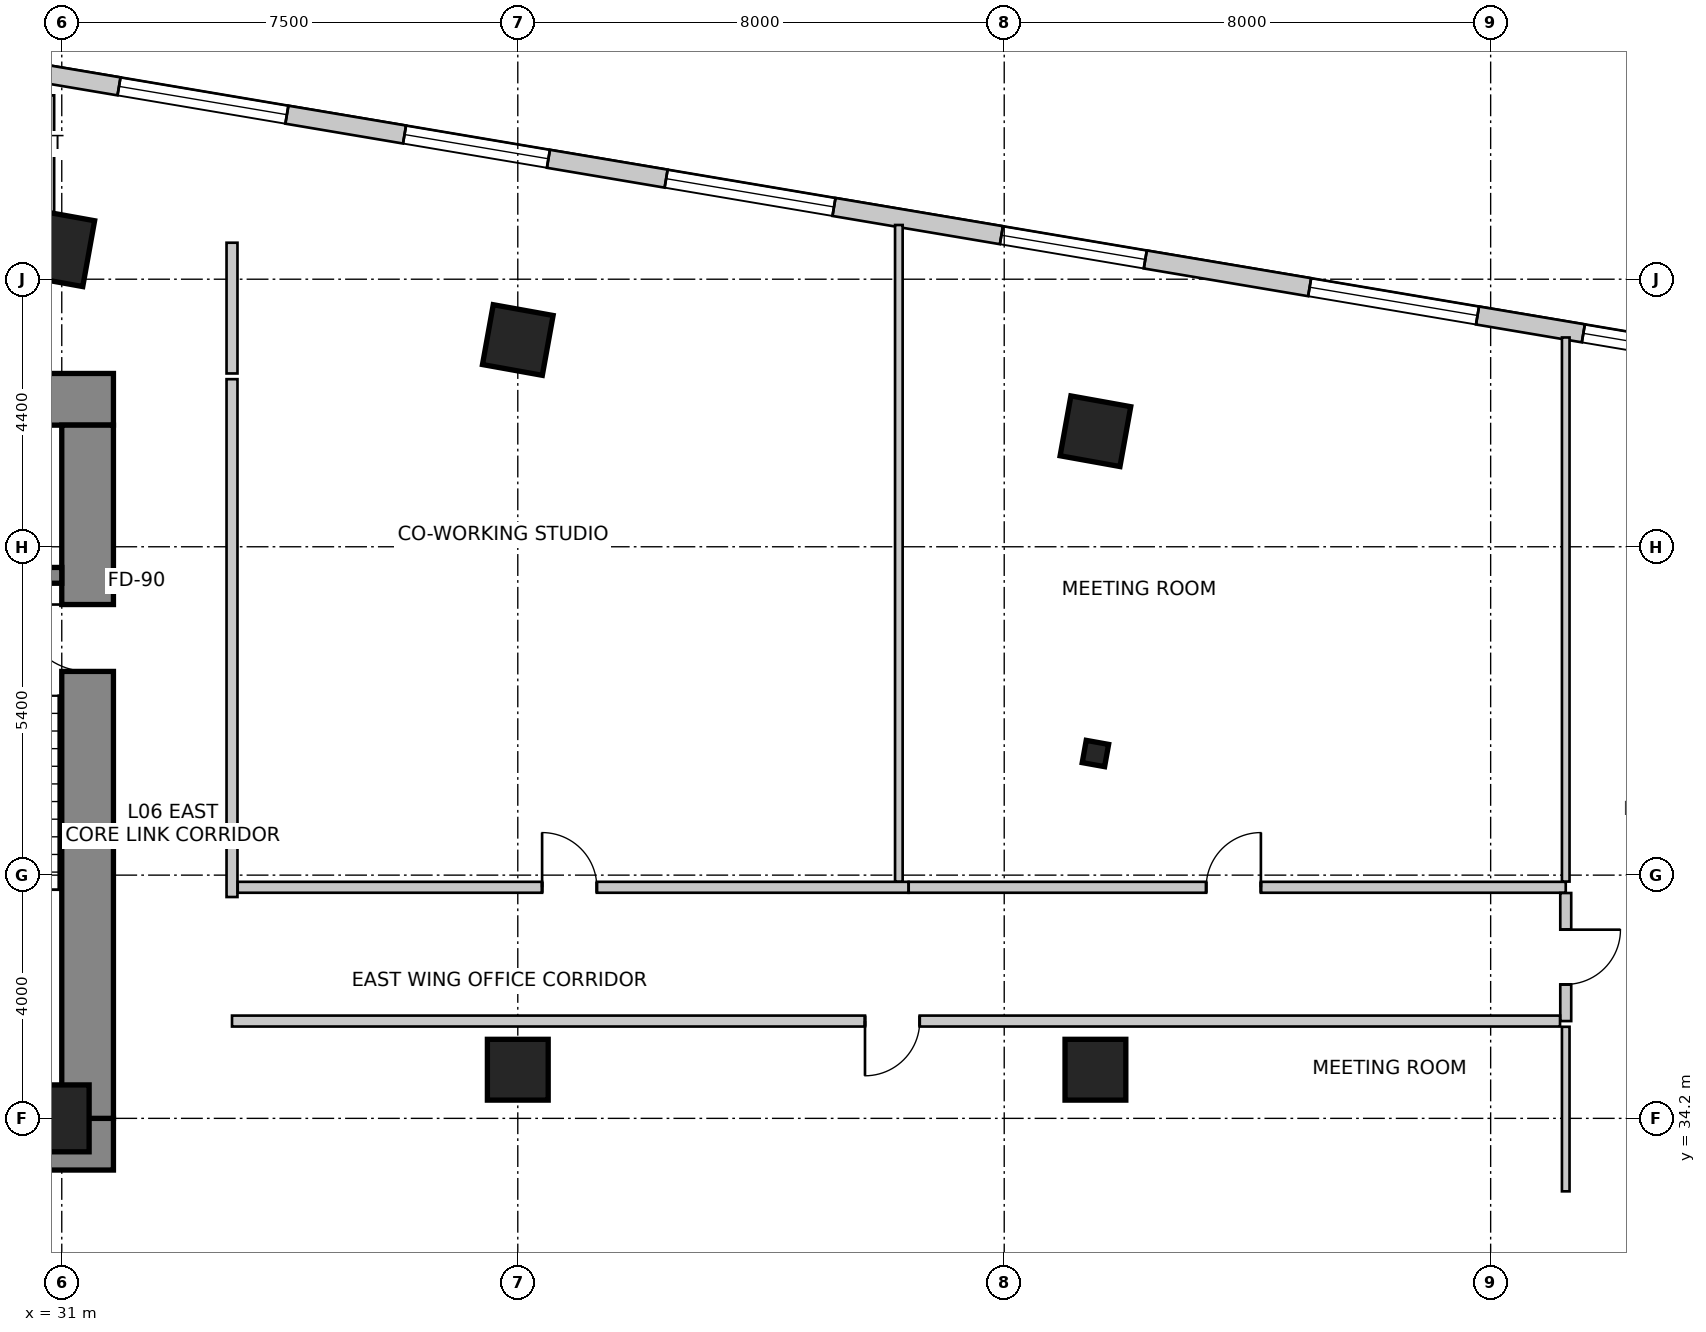
"""IFC4 building model, lengths in metres.
Left out: names, types, materials, properties, quantities, classifications, styles, units other than length and angle.
Written with IfcOpenShell. Run it as: python <this file> out.ifc"""

import sys

from ifc_helpers import new_model, si_unit, direction, frame, frame_2d, origin, origin_2d, place, context, subcontext, project, spatial, rectangle, i_section, extrude, source, transform, mapped, element, fill, save


model = new_model("IFC4")
c1 = context("Model", 3, precision=1e-05, world=origin(), true_north=direction((0.0, 1.0)))
c2 = subcontext(c1, "Body", "Model", "MODEL_VIEW")
j1 = project(units=[si_unit("LENGTHUNIT", "METRE"), si_unit("PLANEANGLEUNIT", "RADIAN")], contexts=[c1])
p1 = place(None, origin())
s1 = spatial("IfcSite", under=j1, at=p1, CompositionType="ELEMENT")
p2 = place(p1, origin())
s2 = spatial("IfcBuilding", under=s1, at=p2, CompositionType="ELEMENT")
p3 = place(p2, frame((0.0, 0.0, 27.0)))
s3 = spatial("IfcBuildingStorey", under=s2, at=p3, CompositionType="ELEMENT", Elevation=27.0)
p4 = place(p3, frame((15.75, 46.025, 0.0), z_axis=(0.0, 0.0, 1.0), x_axis=(1.0, 0.0, 0.0)))
e1 = element("IfcWall", 1, at=p4, inside=s3, PredefinedType="SHEAR", context=c2, shape_type="SweptSolid", body=[
    extrude(rectangle(XDim=16.1, YDim=0.85, at=frame_2d((8.05, 0.0))), origin(), (0.0, 0.0, 1.0), 4.0),
])
p5 = place(p3, frame((15.75, 33.775, 0.0), z_axis=(0.0, 0.0, 1.0), x_axis=(1.0, 0.0, 0.0)))
e2 = element("IfcWall", 2, at=p5, inside=s3, PredefinedType="SHEAR", context=c2, shape_type="SweptSolid", body=[
    extrude(rectangle(XDim=16.1, YDim=0.85, at=frame_2d((8.05, 0.0))), origin(), (0.0, 0.0, 1.0), 4.0),
])
m1 = source(origin(), c2, "Body", "SweptSolid", [
    extrude(rectangle(XDim=1.3, YDim=2.15, at=frame_2d((0.65, 1.075))), frame((0.0, 0.435, 0.0), z_axis=(0.0, -1.0, 0.0), x_axis=(1.0, 0.0, 0.0)), (0.0, 0.0, 1.0), 0.87),
])
p6 = place(p5, frame((10.18, 0.0, 0.0)))
e3 = element("IfcOpeningElement", 3, at=p6, cuts=e2, PredefinedType="OPENING", context=c2, shape_type="MappedRepresentation", body=[
    mapped(m1, transform((0.0, 0.0, 0.0), scale=1.0)),
])
p7 = place(p3, frame((31.425, 34.2, 0.0), z_axis=(0.0, 0.0, 1.0), x_axis=(0.0, 1.0, 0.0)))
e4 = element("IfcWall", 4, at=p7, inside=s3, PredefinedType="SHEAR", context=c2, shape_type="SweptSolid", body=[
    extrude(rectangle(XDim=11.4, YDim=0.85, at=frame_2d((5.7, 0.0))), origin(), (0.0, 0.0, 1.0), 4.0),
])
m2 = source(origin(), c2, "Body", "SweptSolid", [
    extrude(rectangle(XDim=1.1, YDim=2.15, at=frame_2d((0.55, 1.075))), frame((0.0, 0.435, 0.0), z_axis=(0.0, -1.0, 0.0), x_axis=(1.0, 0.0, 0.0)), (0.0, 0.0, 1.0), 0.87),
])
p8 = place(p7, frame((7.35, 0.0, 0.0)))
e5 = element("IfcOpeningElement", 5, at=p8, cuts=e4, PredefinedType="OPENING", context=c2, shape_type="MappedRepresentation", body=[
    mapped(m2, transform((0.0, 0.0, 0.0), scale=1.0)),
])
p9 = place(p3, frame((27.5, 43.13, 0.0), z_axis=(0.0, 0.0, 1.0), x_axis=(1.0, 0.0, 0.0)))
e6 = element("IfcWall", 6, at=p9, inside=s3, PredefinedType="SHEAR", context=c2, shape_type="SweptSolid", body=[
    extrude(rectangle(XDim=3.5, YDim=0.26, at=frame_2d((1.75, 0.0))), origin(), (0.0, 0.0, 1.0), 4.0),
])
m3 = source(origin(), c2, "Body", "SweptSolid", [
    extrude(rectangle(XDim=0.9, YDim=1.1, at=origin_2d()), origin(), (0.0, 0.0, 1.0), 4.0),
])
p10 = place(p3, frame((31.0, 48.5, 0.0), z_axis=(0.0, 0.0, 1.0), x_axis=(0.984195607969, -0.17708474032, 0.0)))
e7 = element("IfcColumn", 7, at=p10, inside=s3, PredefinedType="COLUMN", context=c2, shape_type="MappedRepresentation", body=[
    mapped(m3, transform((0.0, 0.0, 0.0), scale=1.0)),
])
m4 = source(origin(), c2, "Body", "SweptSolid", [
    extrude(rectangle(XDim=1.0, YDim=1.0, at=origin_2d()), origin(), (0.0, 0.0, 1.0), 4.0),
])
for number, where, z_axis, x_axis in (
    (8, (38.5, 47.0, 0.0), (0.0, 0.0, 1.0), (0.984, -0.177, 0.0)),
    (9, (48.0, 45.5, 0.0), (0.0, 0.0, 1.0), (0.984, -0.177, 0.0)),
):
    element("IfcColumn", number, at=place(p3, frame(where, z_axis=z_axis, x_axis=x_axis)), inside=s3, PredefinedType="COLUMN", context=c2, shape_type="MappedRepresentation", body=[
        mapped(m4, transform((0.0, 0.0, 0.0), scale=1.0)),
    ])
p11 = place(p3, frame((31.0, 34.2, 0.0), z_axis=(0.0, 0.0, 1.0), x_axis=(1.0, 0.0, 0.0)))
e10 = element("IfcColumn", 10, at=p11, inside=s3, PredefinedType="COLUMN", context=c2, shape_type="MappedRepresentation", body=[
    mapped(m3, transform((0.0, 0.0, 0.0), scale=1.0)),
])
for number, where, z_axis, x_axis in (
    (11, (38.5, 35.0, 0.0), (0.0, 0.0, 1.0), (1.0, 0.0, 0.0)),
    (12, (48.0, 35.0, 0.0), (0.0, 0.0, 1.0), (1.0, 0.0, 0.0)),
):
    element("IfcColumn", number, at=place(p3, frame(where, z_axis=z_axis, x_axis=x_axis)), inside=s3, PredefinedType="COLUMN", context=c2, shape_type="MappedRepresentation", body=[
        mapped(m4, transform((0.0, 0.0, 0.0), scale=1.0)),
    ])
m5 = source(origin(), c2, "Body", "SweptSolid", [
    extrude(i_section(OverallWidth=0.374, OverallDepth=0.372, WebThickness=0.016, FlangeThickness=0.026, FilletRadius=0.015, at=origin_2d()), origin(), (0.0, 0.0, 1.0), 4.35),
])
p12 = place(p3, frame((48.0, 40.2, -0.35), z_axis=(0.0, 0.0, 1.0), x_axis=(0.984195607969, -0.17708474032, 0.0)))
e13 = element("IfcColumn", 13, at=p12, inside=s3, PredefinedType="COLUMN", context=c2, shape_type="MappedRepresentation", body=[
    mapped(m5, transform((0.0, 0.0, 0.0), scale=1.0)),
])
p13 = place(p3, frame((58.761, 46.648, 0.0), z_axis=(0.0, 0.0, 1.0), x_axis=(-0.98607502735, 0.166301053624, 0.0)))
e14 = element("IfcWall", 14, at=p13, inside=s3, PredefinedType="SOLIDWALL", context=c2, shape_type="SweptSolid", body=[
    extrude(rectangle(XDim=37.397, YDim=0.3, at=frame_2d((18.699, 0.0))), origin(), (0.0, 0.0, 1.0), 3.75),
])
m6 = source(origin(), c2, "Body", "SweptSolid", [
    extrude(rectangle(XDim=2.4, YDim=2.2, at=frame_2d((1.2, 1.1))), frame((0.0, 0.16, 0.0), z_axis=(0.0, -1.0, 0.0), x_axis=(1.0, 0.0, 0.0)), (0.0, 0.0, 1.0), 0.32),
])
p14 = place(p13, frame((0.375, 0.0, 0.85)))
e15 = element("IfcOpeningElement", 15, at=p14, cuts=e14, PredefinedType="OPENING", context=c2, shape_type="MappedRepresentation", body=[
    mapped(m6, transform((0.0, 0.0, 0.0), scale=1.0)),
])
m7 = source(origin(), c2, "Body", "SweptSolid", [
    extrude(rectangle(XDim=2.8, YDim=2.4, at=frame_2d((1.4, 1.2))), frame((0.0, 0.16, 0.0), z_axis=(0.0, -1.0, 0.0), x_axis=(1.0, 0.0, 0.0)), (0.0, 0.0, 1.0), 0.32),
])
p15 = place(p13, frame((4.54, 0.0, 0.85)))
e16 = element("IfcOpeningElement", 16, at=p15, cuts=e14, PredefinedType="OPENING", context=c2, shape_type="MappedRepresentation", body=[
    mapped(m7, transform((0.0, 0.0, 0.0), scale=1.0)),
])
p16 = place(p13, frame((10.081, 0.0, 0.85)))
e17 = element("IfcOpeningElement", 17, at=p16, cuts=e14, PredefinedType="OPENING", context=c2, shape_type="MappedRepresentation", body=[
    mapped(m6, transform((0.0, 0.0, 0.0), scale=1.0)),
])
p17 = place(p13, frame((15.273, 0.0, 0.85)))
e18 = element("IfcOpeningElement", 18, at=p17, cuts=e14, PredefinedType="OPENING", context=c2, shape_type="MappedRepresentation", body=[
    mapped(m7, transform((0.0, 0.0, 0.0), scale=1.0)),
])
p18 = place(p13, frame((20.036, 0.0, 0.85)))
e19 = element("IfcOpeningElement", 19, at=p18, cuts=e14, PredefinedType="OPENING", context=c2, shape_type="MappedRepresentation", body=[
    mapped(m6, transform((0.0, 0.0, 0.0), scale=1.0)),
])
p19 = place(p13, frame((24.398, 0.0, 0.85)))
e20 = element("IfcOpeningElement", 20, at=p19, cuts=e14, PredefinedType="OPENING", context=c2, shape_type="MappedRepresentation", body=[
    mapped(m7, transform((0.0, 0.0, 0.0), scale=1.0)),
])
p20 = place(p13, frame((29.757, 0.0, 0.85)))
e21 = element("IfcOpeningElement", 21, at=p20, cuts=e14, PredefinedType="OPENING", context=c2, shape_type="MappedRepresentation", body=[
    mapped(m7, transform((0.0, 0.0, 0.0), scale=1.0)),
])
p21 = place(p13, frame((34.256, 0.0, 0.85)))
e22 = element("IfcOpeningElement", 22, at=p21, cuts=e14, PredefinedType="OPENING", context=c2, shape_type="MappedRepresentation", body=[
    mapped(m7, transform((0.0, 0.0, 0.0), scale=1.0)),
])
p22 = place(p3, frame((25.362, 48.6, 0.0), z_axis=(0.0, 0.0, 1.0), x_axis=(1.0, 0.0, 0.0)))
e23 = element("IfcWall", 23, at=p22, inside=s3, PredefinedType="PARTITIONING", context=c2, shape_type="SweptSolid", body=[
    extrude(rectangle(XDim=5.598, YDim=0.18, at=frame_2d((2.799, 0.0))), origin(), (0.0, 0.0, 1.0), 2.892),
])
m8 = source(origin(), c2, "Body", "SweptSolid", [
    extrude(rectangle(XDim=0.9, YDim=2.15, at=frame_2d((0.45, 1.075))), frame((0.0, 0.1, 0.0), z_axis=(0.0, -1.0, 0.0), x_axis=(1.0, 0.0, 0.0)), (0.0, 0.0, 1.0), 0.2),
])
p23 = place(p22, frame((2.349, 0.0, 0.0)))
e24 = element("IfcOpeningElement", 24, at=p23, cuts=e23, PredefinedType="OPENING", context=c2, shape_type="MappedRepresentation", body=[
    mapped(m8, transform((0.0, 0.0, 0.0), scale=1.0)),
])
p24 = place(p3, frame((33.8, 48.6, 0.0), z_axis=(0.0, 0.0, 1.0), x_axis=(0.0, -1.0, 0.0)))
e25 = element("IfcWall", 25, at=p24, inside=s3, PredefinedType="PARTITIONING", context=c2, shape_type="SweptSolid", body=[
    extrude(rectangle(XDim=2.15, YDim=0.18, at=frame_2d((1.075, 0.0))), origin(), (0.0, 0.0, 1.0), 2.892),
])
p25 = place(p3, frame((33.8, 46.356, 0.0), z_axis=(0.0, 0.0, 1.0), x_axis=(0.0, -1.0, 0.0)))
e26 = element("IfcWall", 26, at=p25, inside=s3, PredefinedType="PARTITIONING", context=c2, shape_type="SweptSolid", body=[
    extrude(rectangle(XDim=8.516, YDim=0.18, at=frame_2d((4.258, 0.0))), origin(), (0.0, 0.0, 1.0), 3.188),
])
p26 = place(p3, frame((33.894, 38.0, 0.0), z_axis=(0.0, 0.0, 1.0), x_axis=(1.0, 0.0, 0.0)))
e27 = element("IfcWall", 27, at=p26, inside=s3, PredefinedType="PARTITIONING", context=c2, shape_type="SweptSolid", body=[
    extrude(rectangle(XDim=11.033, YDim=0.18, at=frame_2d((5.517, 0.0))), origin(), (0.0, 0.0, 1.0), 3.125),
])
p27 = place(p26, frame((5.006, 0.0, 0.0)))
e28 = element("IfcOpeningElement", 28, at=p27, cuts=e27, PredefinedType="OPENING", context=c2, shape_type="MappedRepresentation", body=[
    mapped(m8, transform((0.0, 0.0, 0.0), scale=1.0)),
])
p28 = place(p3, frame((44.929, 38.0, 0.0), z_axis=(0.0, 0.0, 1.0), x_axis=(1.0, 0.0, 0.0)))
e29 = element("IfcWall", 29, at=p28, inside=s3, PredefinedType="PARTITIONING", context=c2, shape_type="SweptSolid", body=[
    extrude(rectangle(XDim=10.806, YDim=0.18, at=frame_2d((5.403, 0.0))), origin(), (0.0, 0.0, 1.0), 3.125),
])
p29 = place(p28, frame((4.892, 0.0, 0.0)))
e30 = element("IfcOpeningElement", 30, at=p29, cuts=e29, PredefinedType="OPENING", context=c2, shape_type="MappedRepresentation", body=[
    mapped(m8, transform((0.0, 0.0, 0.0), scale=1.0)),
])
p30 = place(p3, frame((55.735, 37.906, 0.0), z_axis=(0.0, 0.0, 1.0), x_axis=(0.0, -1.0, 0.0)))
e31 = element("IfcWall", 31, at=p30, inside=s3, PredefinedType="PARTITIONING", context=c2, shape_type="SweptSolid", body=[
    extrude(rectangle(XDim=2.106, YDim=0.18, at=frame_2d((1.053, 0.0))), origin(), (0.0, 0.0, 1.0), 3.75),
])
p31 = place(p30, frame((0.603, 0.0, 0.0)))
e32 = element("IfcOpeningElement", 32, at=p31, cuts=e31, PredefinedType="OPENING", context=c2, shape_type="MappedRepresentation", body=[
    mapped(m8, transform((0.0, 0.0, 0.0), scale=1.0)),
])
p32 = place(p3, frame((55.641, 35.8, 0.0), z_axis=(0.0, 0.0, 1.0), x_axis=(-1.0, 0.0, 0.0)))
e33 = element("IfcWall", 33, at=p32, inside=s3, PredefinedType="PARTITIONING", context=c2, shape_type="SweptSolid", body=[
    extrude(rectangle(XDim=21.841, YDim=0.18, at=frame_2d((10.92, 0.0))), origin(), (0.0, 0.0, 1.0), 3.125),
])
p33 = place(p32, frame((10.531, 0.0, 0.0)))
e34 = element("IfcOpeningElement", 34, at=p33, cuts=e33, PredefinedType="OPENING", context=c2, shape_type="MappedRepresentation", body=[
    mapped(m8, transform((0.0, 0.0, 0.0), scale=1.0)),
])
p34 = place(p3, frame((44.767, 48.892, 0.0), z_axis=(0.0, 0.0, 1.0), x_axis=(0.0, -1.0, 0.0)))
e35 = element("IfcWall", 35, at=p34, inside=s3, PredefinedType="PARTITIONING", context=c2, shape_type="SweptSolid", body=[
    extrude(rectangle(XDim=10.798, YDim=0.125, at=frame_2d((5.399, 0.0))), origin(), (0.0, 0.0, 1.0), 2.892),
])
p35 = place(p3, frame((55.735, 47.042, 0.0), z_axis=(0.0, 0.0, 1.0), x_axis=(0.0, -1.0, 0.0)))
e36 = element("IfcWall", 36, at=p35, inside=s3, PredefinedType="PARTITIONING", context=c2, shape_type="SweptSolid", body=[
    extrude(rectangle(XDim=8.948, YDim=0.125, at=frame_2d((4.474, 0.0))), origin(), (0.0, 0.0, 1.0), 3.75),
])
p36 = place(p3, frame((55.735, 33.0, 0.0), z_axis=(0.0, 0.0, 1.0), x_axis=(0.0, 1.0, 0.0)))
e37 = element("IfcWall", 37, at=p36, inside=s3, PredefinedType="PARTITIONING", context=c2, shape_type="SweptSolid", body=[
    extrude(rectangle(XDim=2.706, YDim=0.125, at=frame_2d((1.353, 0.0))), origin(), (0.0, 0.0, 1.0), 3.75),
])
p37 = place(p3, frame((30.8, 51.024, 0.0), z_axis=(0.0, 0.0, 1.0), x_axis=(0.0, -1.0, 0.0)))
e38 = element("IfcWall", 38, at=p37, inside=s3, PredefinedType="PARTITIONING", context=c2, shape_type="SweptSolid", body=[
    extrude(rectangle(XDim=2.204, YDim=0.15, at=frame_2d((1.102, 0.0))), origin(), (0.0, 0.0, 1.0), 3.75),
])
m9 = source(origin(), c2, "Body", "SweptSolid", [
    extrude(rectangle(XDim=2.4, YDim=2.2, at=frame_2d((1.2, 1.1))), frame((0.0, -0.015, 0.0), z_axis=(0.0, -1.0, 0.0), x_axis=(1.0, 0.0, 0.0)), (0.0, 0.0, 1.0), 0.06),
])
p38 = place(p14, origin())
e39 = element("IfcWindow", 39, at=p38, inside=s3, PartitioningType="SINGLE_PANEL", PredefinedType="WINDOW", context=c2, shape_type="MappedRepresentation", body=[
    mapped(m9, transform((0.0, 0.0, 0.0), scale=1.0)),
])
fill(e15, e39)
m10 = source(origin(), c2, "Body", "SweptSolid", [
    extrude(rectangle(XDim=2.8, YDim=2.4, at=frame_2d((1.4, 1.2))), frame((0.0, -0.015, 0.0), z_axis=(0.0, -1.0, 0.0), x_axis=(1.0, 0.0, 0.0)), (0.0, 0.0, 1.0), 0.06),
])
p39 = place(p15, origin())
e40 = element("IfcWindow", 40, at=p39, inside=s3, PartitioningType="SINGLE_PANEL", PredefinedType="WINDOW", context=c2, shape_type="MappedRepresentation", body=[
    mapped(m10, transform((0.0, 0.0, 0.0), scale=1.0)),
])
fill(e16, e40)
p40 = place(p16, origin())
e41 = element("IfcWindow", 41, at=p40, inside=s3, PartitioningType="SINGLE_PANEL", PredefinedType="WINDOW", context=c2, shape_type="MappedRepresentation", body=[
    mapped(m9, transform((0.0, 0.0, 0.0), scale=1.0)),
])
fill(e17, e41)
p41 = place(p17, origin())
e42 = element("IfcWindow", 42, at=p41, inside=s3, PartitioningType="SINGLE_PANEL", PredefinedType="WINDOW", context=c2, shape_type="MappedRepresentation", body=[
    mapped(m10, transform((0.0, 0.0, 0.0), scale=1.0)),
])
fill(e18, e42)
p42 = place(p18, origin())
e43 = element("IfcWindow", 43, at=p42, inside=s3, PartitioningType="SINGLE_PANEL", PredefinedType="WINDOW", context=c2, shape_type="MappedRepresentation", body=[
    mapped(m9, transform((0.0, 0.0, 0.0), scale=1.0)),
])
fill(e19, e43)
p43 = place(p19, origin())
e44 = element("IfcWindow", 44, at=p43, inside=s3, PartitioningType="SINGLE_PANEL", PredefinedType="WINDOW", context=c2, shape_type="MappedRepresentation", body=[
    mapped(m10, transform((0.0, 0.0, 0.0), scale=1.0)),
])
fill(e20, e44)
m11 = source(origin(), c2, "Body", "SweptSolid", [
    extrude(rectangle(XDim=1.1, YDim=2.15, at=frame_2d((0.55, 1.075))), frame((0.0, 0.025, 0.0), z_axis=(0.0, -1.0, 0.0), x_axis=(1.0, 0.0, 0.0)), (0.0, 0.0, 1.0), 0.05),
])
p44 = place(p8, origin())
e45 = element("IfcDoor", 45, at=p44, inside=s3, OperationType="SINGLE_SWING_RIGHT", PredefinedType="DOOR", context=c2, shape_type="MappedRepresentation", body=[
    mapped(m11, transform((0.0, 0.0, 0.0), scale=1.0)),
])
fill(e5, e45)
m12 = source(origin(), c2, "Body", "SweptSolid", [
    extrude(rectangle(XDim=0.9, YDim=2.15, at=frame_2d((0.45, 1.075))), frame((0.0, 0.025, 0.0), z_axis=(0.0, -1.0, 0.0), x_axis=(1.0, 0.0, 0.0)), (0.0, 0.0, 1.0), 0.05),
])
p45 = place(p27, origin())
e46 = element("IfcDoor", 46, at=p45, inside=s3, OperationType="SINGLE_SWING_LEFT", PredefinedType="DOOR", context=c2, shape_type="MappedRepresentation", body=[
    mapped(m12, transform((0.0, 0.0, 0.0), scale=1.0)),
])
fill(e28, e46)
p46 = place(p29, origin())
e47 = element("IfcDoor", 47, at=p46, inside=s3, OperationType="SINGLE_SWING_RIGHT", PredefinedType="DOOR", context=c2, shape_type="MappedRepresentation", body=[
    mapped(m12, transform((0.0, 0.0, 0.0), scale=1.0)),
])
fill(e30, e47)
p47 = place(p31, origin())
e48 = element("IfcDoor", 48, at=p47, inside=s3, OperationType="SINGLE_SWING_LEFT", PredefinedType="DOOR", context=c2, shape_type="MappedRepresentation", body=[
    mapped(m12, transform((0.0, 0.0, 0.0), scale=1.0)),
])
fill(e32, e48)
p48 = place(p33, origin())
e49 = element("IfcDoor", 49, at=p48, inside=s3, OperationType="SINGLE_SWING_RIGHT", PredefinedType="DOOR", context=c2, shape_type="MappedRepresentation", body=[
    mapped(m12, transform((0.0, 0.0, 0.0), scale=1.0)),
])
fill(e34, e49)
save(model, sys.argv[1])
